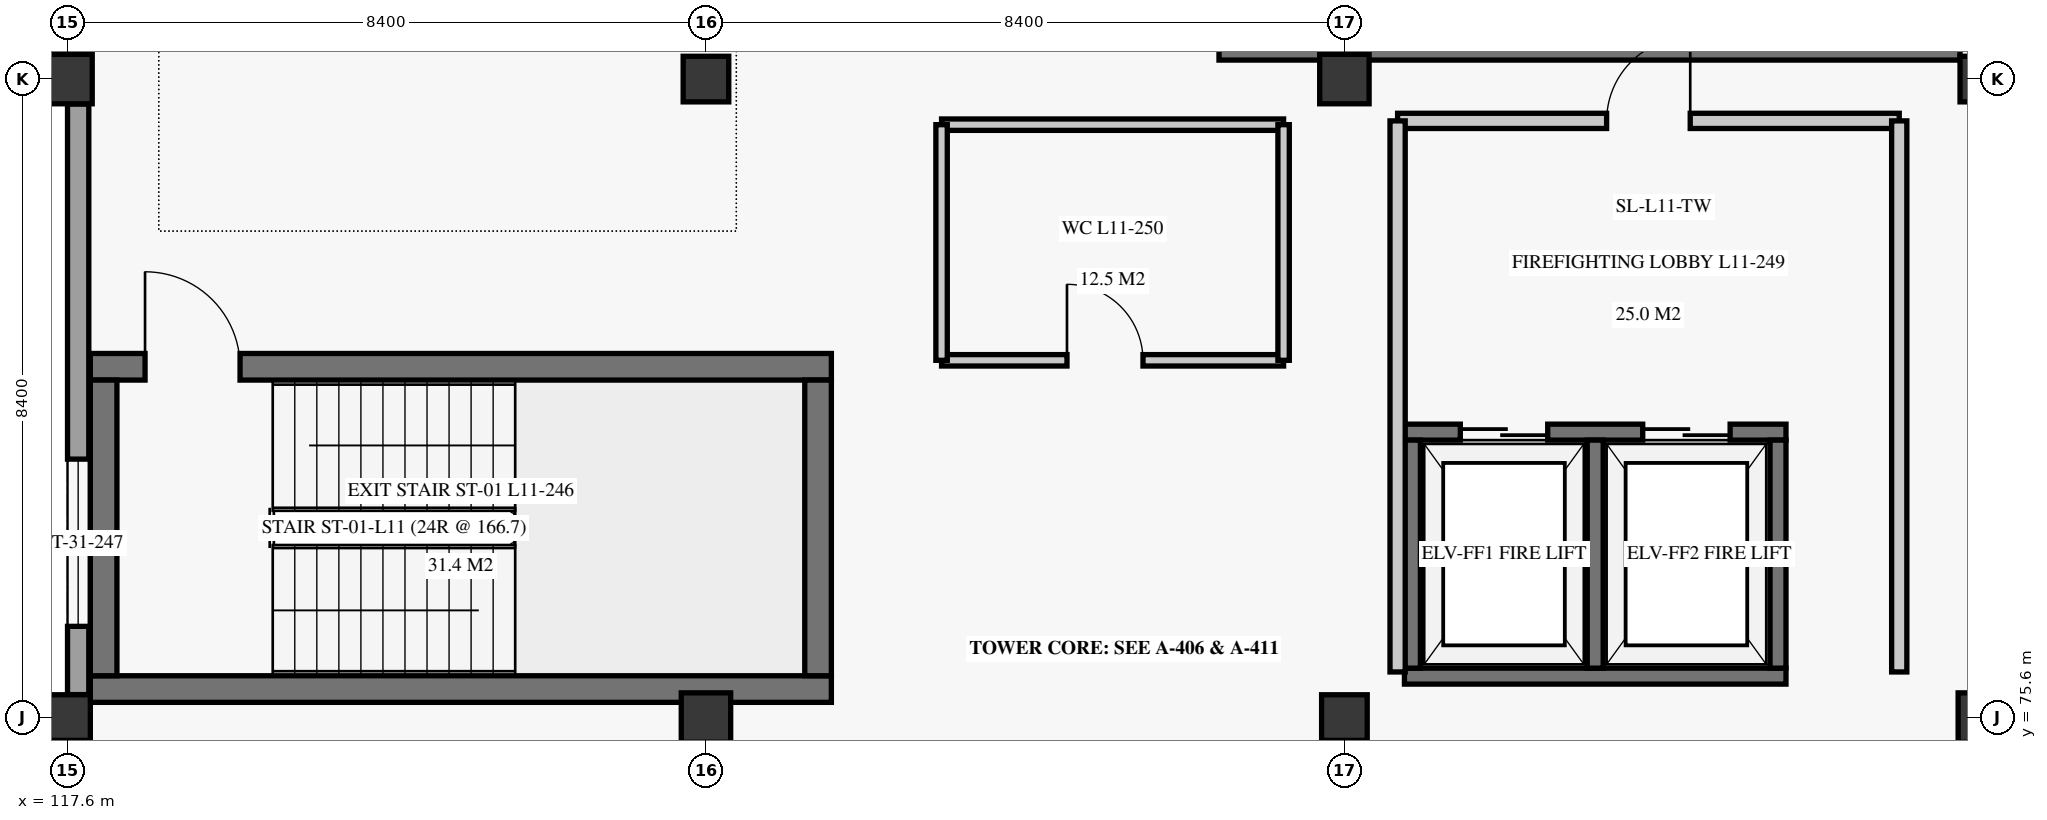
"""IFC4 building model, lengths in metres.
Left out: names, types, materials, properties, quantities, classifications, styles, units other than length and angle.
Written with IfcOpenShell. Run it as: python <this file> out.ifc"""

import sys

from ifc_helpers import new_model, si_unit, direction, frame, frame_2d, origin, origin_2d, place, context, subcontext, project, spatial, rectangle, extrude, element, fill, save


model = new_model("IFC4")
c1 = context("Model", 3, precision=1e-05, world=origin(), true_north=direction((0.0, 1.0)))
c2 = subcontext(c1, "Body", "Model", "MODEL_VIEW")
j1 = project(units=[si_unit("LENGTHUNIT", "METRE"), si_unit("PLANEANGLEUNIT", "RADIAN")], contexts=[c1])
p1 = place(None, origin())
s1 = spatial("IfcSite", under=j1, at=p1, CompositionType="ELEMENT")
p2 = place(p1, origin())
s2 = spatial("IfcBuilding", under=s1, at=p2, CompositionType="ELEMENT")
p3 = place(p2, frame((0.0, 0.0, 46.7)))
s3 = spatial("IfcBuildingStorey", under=s2, at=p3, CompositionType="ELEMENT", Elevation=46.7)
p4 = place(p3, frame((117.6, 75.6, 0.0), z_axis=(0.0, 0.0, 1.0), x_axis=(1.0, 0.0, 0.0)))
e1 = element("IfcColumn", 1, at=p4, inside=s3, PredefinedType="COLUMN", context=c2, shape_type="SweptSolid", body=[
    extrude(rectangle(XDim=0.6, YDim=0.6, at=origin_2d()), origin(), (0.0, 0.0, 1.0), 3.72),
])
for number, where, z_axis, x_axis in (
    (2, (117.6, 84.0, 0.0), (0.0, 0.0, 1.0), (1.0, 0.0, 0.0)),
    (3, (126.0, 75.6, 0.0), (0.0, 0.0, 1.0), (1.0, 0.0, 0.0)),
):
    element("IfcColumn", number, at=place(p3, frame(where, z_axis=z_axis, x_axis=x_axis)), inside=s3, PredefinedType="COLUMN", context=c2, shape_type="SweptSolid", body=[
        extrude(rectangle(XDim=0.65, YDim=0.65, at=origin_2d()), origin(), (0.0, 0.0, 1.0), 3.72),
    ])
for number, where, z_axis, x_axis in (
    (4, (126.0, 84.0, 0.0), (0.0, 0.0, 1.0), (1.0, 0.0, 0.0)),
    (5, (134.4, 75.6, 0.0), (0.0, 0.0, 1.0), (1.0, 0.0, 0.0)),
):
    element("IfcColumn", number, at=place(p3, frame(where, z_axis=z_axis, x_axis=x_axis)), inside=s3, PredefinedType="COLUMN", context=c2, shape_type="SweptSolid", body=[
        extrude(rectangle(XDim=0.6, YDim=0.6, at=origin_2d()), origin(), (0.0, 0.0, 1.0), 3.72),
    ])
for number, where, z_axis, x_axis in (
    (6, (134.4, 84.0, 0.0), (0.0, 0.0, 1.0), (1.0, 0.0, 0.0)),
    (7, (142.8, 75.6, 0.0), (0.0, 0.0, 1.0), (1.0, 0.0, 0.0)),
):
    element("IfcColumn", number, at=place(p3, frame(where, z_axis=z_axis, x_axis=x_axis)), inside=s3, PredefinedType="COLUMN", context=c2, shape_type="SweptSolid", body=[
        extrude(rectangle(XDim=0.65, YDim=0.65, at=origin_2d()), origin(), (0.0, 0.0, 1.0), 3.72),
    ])
p5 = place(p3, frame((142.8, 84.0, 0.0), z_axis=(0.0, 0.0, 1.0), x_axis=(1.0, 0.0, 0.0)))
e8 = element("IfcColumn", 8, at=p5, inside=s3, PredefinedType="COLUMN", context=c2, shape_type="SweptSolid", body=[
    extrude(rectangle(XDim=0.6, YDim=0.6, at=origin_2d()), origin(), (0.0, 0.0, 1.0), 3.72),
])
p6 = place(p3, frame((117.74, 75.902, 0.0), z_axis=(0.0, 0.0, 1.0), x_axis=(0.0, 1.0, 0.0)))
e9 = element("IfcWall", 9, at=p6, inside=s3, PredefinedType="SOLIDWALL", context=c2, shape_type="SweptSolid", body=[
    extrude(rectangle(XDim=7.77, YDim=0.28, at=frame_2d((3.885, 0.0))), origin(), (0.0, 0.0, 1.0), 3.04),
])
p7 = place(p6, frame((0.898, 0.0, 0.85)))
e10 = element("IfcOpeningElement", 10, at=p7, cuts=e9, PredefinedType="OPENING", context=c2, shape_type="SweptSolid", body=[
    extrude(rectangle(XDim=2.2, YDim=1.8, at=frame_2d((1.1, 0.9))), frame((0.0, 0.15, 0.0), z_axis=(0.0, -1.0, 0.0), x_axis=(1.0, 0.0, 0.0)), (0.0, 0.0, 1.0), 0.3),
])
p8 = place(p3, frame((117.9, 75.975, 0.0), z_axis=(0.0, 0.0, 1.0), x_axis=(1.0, 0.0, 0.0)))
e11 = element("IfcWall", 11, at=p8, inside=s3, PredefinedType="SHEAR", context=c2, shape_type="SweptSolid", body=[
    extrude(rectangle(XDim=9.75, YDim=0.35, at=frame_2d((4.875, 0.0))), origin(), (0.0, 0.0, 1.0), 3.72),
])
p9 = place(p3, frame((117.9, 80.215, 0.0), z_axis=(0.0, 0.0, 1.0), x_axis=(1.0, 0.0, 0.0)))
e12 = element("IfcWall", 12, at=p9, inside=s3, PredefinedType="SHEAR", context=c2, shape_type="SweptSolid", body=[
    extrude(rectangle(XDim=9.75, YDim=0.35, at=frame_2d((4.875, 0.0))), origin(), (0.0, 0.0, 1.0), 3.72),
])
p10 = place(p9, frame((0.72, 0.0, 0.0)))
e13 = element("IfcOpeningElement", 13, at=p10, cuts=e12, PredefinedType="OPENING", context=c2, shape_type="SweptSolid", body=[
    extrude(rectangle(XDim=1.25, YDim=2.2, at=frame_2d((0.625, 1.1))), frame((0.0, 0.185, 0.0), z_axis=(0.0, -1.0, 0.0), x_axis=(1.0, 0.0, 0.0)), (0.0, 0.0, 1.0), 0.37),
])
for number, where, z_axis, x_axis in (
    (14, (118.075, 76.15, 0.0), (0.0, 0.0, 1.0), (0.0, 1.0, 0.0)),
    (15, (127.475, 76.15, 0.0), (0.0, 0.0, 1.0), (0.0, 1.0, 0.0)),
):
    element("IfcWall", number, at=place(p3, frame(where, z_axis=z_axis, x_axis=x_axis)), inside=s3, PredefinedType="SHEAR", context=c2, shape_type="SweptSolid", body=[
        extrude(rectangle(XDim=3.89, YDim=0.35, at=frame_2d((1.945, 0.0))), origin(), (0.0, 0.0, 1.0), 3.72),
    ])
p11 = place(p3, frame((132.75, 84.425, 0.0), z_axis=(0.0, 0.0, 1.0), x_axis=(1.0, 0.0, 0.0)))
e16 = element("IfcWall", 16, at=p11, inside=s3, PredefinedType="SHEAR", context=c2, shape_type="SweptSolid", body=[
    extrude(rectangle(XDim=9.75, YDim=0.35, at=frame_2d((4.875, 0.0))), origin(), (0.0, 0.0, 1.0), 3.72),
])
p12 = place(p3, frame((135.19, 76.145, 0.0), z_axis=(0.0, 0.0, 1.0), x_axis=(1.0, 0.0, 0.0)))
e17 = element("IfcWall", 17, at=p12, inside=s3, PredefinedType="SHEAR", context=c2, shape_type="SweptSolid", body=[
    extrude(rectangle(XDim=5.02, YDim=0.21, at=frame_2d((2.51, 0.0))), origin(), (0.0, 0.0, 1.0), 3.72),
])
p13 = place(p3, frame((135.19, 79.355, 0.0), z_axis=(0.0, 0.0, 1.0), x_axis=(1.0, 0.0, 0.0)))
e18 = element("IfcWall", 18, at=p13, inside=s3, PredefinedType="SHEAR", context=c2, shape_type="SweptSolid", body=[
    extrude(rectangle(XDim=5.02, YDim=0.21, at=frame_2d((2.51, 0.0))), origin(), (0.0, 0.0, 1.0), 3.72),
])
p14 = place(p13, frame((0.735, 0.0, 0.0)))
e19 = element("IfcOpeningElement", 19, at=p14, cuts=e18, PredefinedType="OPENING", context=c2, shape_type="SweptSolid", body=[
    extrude(rectangle(XDim=1.15, YDim=2.2, at=frame_2d((0.575, 1.1))), frame((0.0, 0.115, 0.0), z_axis=(0.0, -1.0, 0.0), x_axis=(1.0, 0.0, 0.0)), (0.0, 0.0, 1.0), 0.23),
])
p15 = place(p13, frame((3.135, 0.0, 0.0)))
e20 = element("IfcOpeningElement", 20, at=p15, cuts=e18, PredefinedType="OPENING", context=c2, shape_type="SweptSolid", body=[
    extrude(rectangle(XDim=1.15, YDim=2.2, at=frame_2d((0.575, 1.1))), frame((0.0, 0.115, 0.0), z_axis=(0.0, -1.0, 0.0), x_axis=(1.0, 0.0, 0.0)), (0.0, 0.0, 1.0), 0.23),
])
for number, where, z_axis, x_axis in (
    (21, (135.295, 76.25, 0.0), (0.0, 0.0, 1.0), (0.0, 1.0, 0.0)),
    (22, (140.105, 76.25, 0.0), (0.0, 0.0, 1.0), (0.0, 1.0, 0.0)),
    (23, (137.7, 76.25, 0.0), (0.0, 0.0, 1.0), (0.0, 1.0, 0.0)),
):
    element("IfcWall", number, at=place(p3, frame(where, z_axis=z_axis, x_axis=x_axis)), inside=s3, PredefinedType="SHEAR", context=c2, shape_type="SweptSolid", body=[
        extrude(rectangle(XDim=3.0, YDim=0.21, at=frame_2d((1.5, 0.0))), origin(), (0.0, 0.0, 1.0), 3.72),
    ])
p16 = place(p3, frame((135.1, 83.45, 0.0), z_axis=(0.0, 0.0, 1.0), x_axis=(1.0, 0.0, 0.0)))
e24 = element("IfcWall", 24, at=p16, inside=s3, PredefinedType="PARTITIONING", context=c2, shape_type="SweptSolid", body=[
    extrude(rectangle(XDim=6.6, YDim=0.2, at=frame_2d((3.3, 0.0))), origin(), (0.0, 0.0, 1.0), 3.34),
])
p17 = place(p16, frame((2.75, 0.0, 0.0)))
e25 = element("IfcOpeningElement", 25, at=p17, cuts=e24, PredefinedType="OPENING", context=c2, shape_type="SweptSolid", body=[
    extrude(rectangle(XDim=1.1, YDim=2.2, at=frame_2d((0.55, 1.1))), frame((0.0, 0.11, 0.0), z_axis=(0.0, -1.0, 0.0), x_axis=(1.0, 0.0, 0.0)), (0.0, 0.0, 1.0), 0.22),
])
for number, where, z_axis, x_axis in (
    (26, (135.1, 76.2, 0.0), (0.0, 0.0, 1.0), (0.0, 1.0, 0.0)),
    (27, (141.7, 76.2, 0.0), (0.0, 0.0, 1.0), (0.0, 1.0, 0.0)),
):
    element("IfcWall", number, at=place(p3, frame(where, z_axis=z_axis, x_axis=x_axis)), inside=s3, PredefinedType="PARTITIONING", context=c2, shape_type="SweptSolid", body=[
        extrude(rectangle(XDim=7.25, YDim=0.2, at=frame_2d((3.625, 0.0))), origin(), (0.0, 0.0, 1.0), 3.34),
    ])
p18 = place(p3, frame((129.1, 80.3, 0.0), z_axis=(0.0, 0.0, 1.0), x_axis=(1.0, 0.0, 0.0)))
e28 = element("IfcWall", 28, at=p18, inside=s3, PredefinedType="PARTITIONING", context=c2, shape_type="SweptSolid", body=[
    extrude(rectangle(XDim=4.5, YDim=0.15, at=frame_2d((2.25, 0.0))), origin(), (0.0, 0.0, 1.0), 3.34),
])
p19 = place(p18, frame((1.65, 0.0, 0.0)))
e29 = element("IfcOpeningElement", 29, at=p19, cuts=e28, PredefinedType="OPENING", context=c2, shape_type="SweptSolid", body=[
    extrude(rectangle(XDim=1.0, YDim=2.1, at=frame_2d((0.5, 1.05))), frame((0.0, 0.085, 0.0), z_axis=(0.0, -1.0, 0.0), x_axis=(1.0, 0.0, 0.0)), (0.0, 0.0, 1.0), 0.17),
])
p20 = place(p3, frame((129.1, 83.4, 0.0), z_axis=(0.0, 0.0, 1.0), x_axis=(1.0, 0.0, 0.0)))
e30 = element("IfcWall", 30, at=p20, inside=s3, PredefinedType="PARTITIONING", context=c2, shape_type="SweptSolid", body=[
    extrude(rectangle(XDim=4.5, YDim=0.15, at=frame_2d((2.25, 0.0))), origin(), (0.0, 0.0, 1.0), 3.34),
])
for number, where, z_axis, x_axis in (
    (31, (129.1, 80.3, 0.0), (0.0, 0.0, 1.0), (0.0, 1.0, 0.0)),
    (32, (133.6, 80.3, 0.0), (0.0, 0.0, 1.0), (0.0, 1.0, 0.0)),
):
    element("IfcWall", number, at=place(p3, frame(where, z_axis=z_axis, x_axis=x_axis)), inside=s3, PredefinedType="PARTITIONING", context=c2, shape_type="SweptSolid", body=[
        extrude(rectangle(XDim=3.1, YDim=0.15, at=frame_2d((1.55, 0.0))), origin(), (0.0, 0.0, 1.0), 3.34),
    ])
p21 = place(p7, origin())
e33 = element("IfcWindow", 33, at=p21, inside=s3, PartitioningType="SINGLE_PANEL", PredefinedType="WINDOW", context=c2, shape_type="SweptSolid", body=[
    extrude(rectangle(XDim=2.2, YDim=1.8, at=frame_2d((1.1, 0.9))), frame((0.0, 0.03, 0.0), z_axis=(0.0, -1.0, 0.0), x_axis=(1.0, 0.0, 0.0)), (0.0, 0.0, 1.0), 0.06),
])
fill(e10, e33)
p22 = place(p10, origin())
e34 = element("IfcDoor", 34, at=p22, inside=s3, OperationType="SINGLE_SWING_LEFT", PredefinedType="DOOR", context=c2, shape_type="SweptSolid", body=[
    extrude(rectangle(XDim=1.25, YDim=2.2, at=frame_2d((0.625, 1.1))), frame((0.0, 0.025, 0.0), z_axis=(0.0, -1.0, 0.0), x_axis=(1.0, 0.0, 0.0)), (0.0, 0.0, 1.0), 0.05),
])
fill(e13, e34)
p23 = place(p14, origin())
e35 = element("IfcDoor", 35, at=p23, inside=s3, OperationType="DOUBLE_DOOR_SLIDING", PredefinedType="DOOR", context=c2, shape_type="SweptSolid", body=[
    extrude(rectangle(XDim=1.15, YDim=2.2, at=frame_2d((0.575, 1.1))), frame((0.0, 0.025, 0.0), z_axis=(0.0, -1.0, 0.0), x_axis=(1.0, 0.0, 0.0)), (0.0, 0.0, 1.0), 0.05),
])
fill(e19, e35)
p24 = place(p15, origin())
e36 = element("IfcDoor", 36, at=p24, inside=s3, OperationType="DOUBLE_DOOR_SLIDING", PredefinedType="DOOR", context=c2, shape_type="SweptSolid", body=[
    extrude(rectangle(XDim=1.15, YDim=2.2, at=frame_2d((0.575, 1.1))), frame((0.0, 0.025, 0.0), z_axis=(0.0, -1.0, 0.0), x_axis=(1.0, 0.0, 0.0)), (0.0, 0.0, 1.0), 0.05),
])
fill(e20, e36)
p25 = place(p17, origin())
e37 = element("IfcDoor", 37, at=p25, inside=s3, OperationType="SINGLE_SWING_RIGHT", PredefinedType="DOOR", context=c2, shape_type="SweptSolid", body=[
    extrude(rectangle(XDim=1.1, YDim=2.2, at=frame_2d((0.55, 1.1))), frame((0.0, 0.025, 0.0), z_axis=(0.0, -1.0, 0.0), x_axis=(1.0, 0.0, 0.0)), (0.0, 0.0, 1.0), 0.05),
])
fill(e25, e37)
p26 = place(p19, origin())
e38 = element("IfcDoor", 38, at=p26, inside=s3, OperationType="SINGLE_SWING_LEFT", PredefinedType="DOOR", context=c2, shape_type="SweptSolid", body=[
    extrude(rectangle(XDim=1.0, YDim=2.1, at=frame_2d((0.5, 1.05))), frame((0.0, 0.025, 0.0), z_axis=(0.0, -1.0, 0.0), x_axis=(1.0, 0.0, 0.0)), (0.0, 0.0, 1.0), 0.05),
])
fill(e29, e38)
save(model, sys.argv[1])
